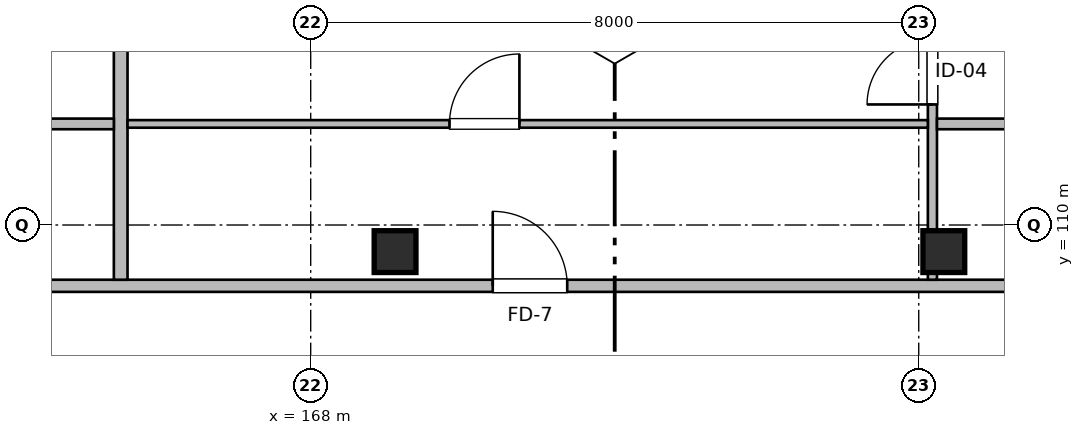
"""IFC4 building model, lengths in metres.
Left out: names, types, materials, properties, quantities, classifications, styles, units other than length and angle.
Written with IfcOpenShell. Run it as: python <this file> out.ifc"""

import sys

from ifc_helpers import new_model, si_unit, direction, frame, frame_2d, origin, origin_2d, place, context, subcontext, project, spatial, rectangle, extrude, element, fill, save


model = new_model("IFC4")
c1 = context("Model", 3, precision=1e-05, world=origin(), true_north=direction((0.0, 1.0)))
c2 = subcontext(c1, "Body", "Model", "MODEL_VIEW")
j1 = project(units=[si_unit("LENGTHUNIT", "METRE"), si_unit("PLANEANGLEUNIT", "RADIAN")], contexts=[c1])
p1 = place(None, origin())
s1 = spatial("IfcSite", under=j1, at=p1, CompositionType="ELEMENT")
p2 = place(p1, origin())
s2 = spatial("IfcBuilding", under=s1, at=p2, CompositionType="ELEMENT")
p3 = place(p2, frame((0.0, 0.0, 29.76)))
s3 = spatial("IfcBuildingStorey", under=s2, at=p3, CompositionType="ELEMENT", Elevation=29.76)
for number, where, z_axis, x_axis in (
    (1, (169.11, 109.65, 0.0), (0.0, 0.0, 1.0), (1.0, 0.0, 0.0)),
    (2, (176.33, 109.65, 0.0), (0.0, 0.0, 1.0), (1.0, 0.0, 0.0)),
):
    element("IfcColumn", number, at=place(p3, frame(where, z_axis=z_axis, x_axis=x_axis)), inside=s3, PredefinedType="COLUMN", context=c2, shape_type="SweptSolid", body=[
        extrude(rectangle(XDim=0.55, YDim=0.55, at=origin_2d()), origin(), (0.0, 0.0, 1.0), 3.2),
    ])
p4 = place(p3, frame((147.16, 109.2, 0.0), z_axis=(0.0, 0.0, 1.0), x_axis=(1.0, 0.0, 0.0)))
e3 = element("IfcWall", 3, at=p4, inside=s3, PredefinedType="PARTITIONING", context=c2, shape_type="SweptSolid", body=[
    extrude(rectangle(XDim=36.68, YDim=0.16, at=frame_2d((18.34, 0.0))), origin(), (0.0, 0.0, 1.0), 2.935),
])
p5 = place(p4, frame((4.805, 0.0, 0.0)))
e4 = element("IfcOpeningElement", 4, at=p5, cuts=e3, PredefinedType="OPENING", context=c2, shape_type="SweptSolid", body=[
    extrude(rectangle(XDim=0.98, YDim=2.15, at=frame_2d((0.49, 1.075))), frame((0.0, 0.09, 0.0), z_axis=(0.0, -1.0, 0.0), x_axis=(1.0, 0.0, 0.0)), (0.0, 0.0, 1.0), 0.18),
])
p6 = place(p4, frame((23.235, 0.0, 0.0)))
e5 = element("IfcOpeningElement", 5, at=p6, cuts=e3, PredefinedType="OPENING", context=c2, shape_type="SweptSolid", body=[
    extrude(rectangle(XDim=0.98, YDim=2.15, at=frame_2d((0.49, 1.075))), frame((0.0, 0.09, 0.0), z_axis=(0.0, -1.0, 0.0), x_axis=(1.0, 0.0, 0.0)), (0.0, 0.0, 1.0), 0.18),
])
p7 = place(p3, frame((165.5, 109.28, 0.0), z_axis=(0.0, 0.0, 1.0), x_axis=(0.0, 1.0, 0.0)))
e6 = element("IfcWall", 6, at=p7, inside=s3, PredefinedType="PARTITIONING", context=c2, shape_type="SweptSolid", body=[
    extrude(rectangle(XDim=6.59, YDim=0.18, at=frame_2d((3.295, 0.0))), origin(), (0.0, 0.0, 1.0), 2.935),
])
p8 = place(p3, frame((157.81, 111.33, 0.0), z_axis=(0.0, 0.0, 1.0), x_axis=(1.0, 0.0, 0.0)))
e7 = element("IfcWall", 7, at=p8, inside=s3, PredefinedType="PARTITIONING", context=c2, shape_type="SweptSolid", body=[
    extrude(rectangle(XDim=7.6, YDim=0.14, at=frame_2d((3.8, 0.0))), origin(), (0.0, 0.0, 1.0), 2.935),
])
p9 = place(p8, frame((3.064, 0.0, 0.0)))
e8 = element("IfcOpeningElement", 8, at=p9, cuts=e7, PredefinedType="OPENING", context=c2, shape_type="SweptSolid", body=[
    extrude(rectangle(XDim=0.85, YDim=2.05, at=frame_2d((0.425, 1.025))), frame((0.0, 0.08, 0.0), z_axis=(0.0, -1.0, 0.0), x_axis=(1.0, 0.0, 0.0)), (0.0, 0.0, 1.0), 0.16),
])
p10 = place(p3, frame((176.18, 109.28, 0.0), z_axis=(0.0, 0.0, 1.0), x_axis=(0.0, 1.0, 0.0)))
e9 = element("IfcWall", 9, at=p10, inside=s3, PredefinedType="PARTITIONING", context=c2, shape_type="SweptSolid", body=[
    extrude(rectangle(XDim=6.59, YDim=0.12, at=frame_2d((3.295, 0.0))), origin(), (0.0, 0.0, 1.0), 2.58),
])
p11 = place(p10, frame((2.306, 0.0, 0.0)))
e10 = element("IfcOpeningElement", 10, at=p11, cuts=e9, PredefinedType="OPENING", context=c2, shape_type="SweptSolid", body=[
    extrude(rectangle(XDim=0.86, YDim=2.1, at=frame_2d((0.43, 1.05))), frame((0.0, 0.07, 0.0), z_axis=(0.0, -1.0, 0.0), x_axis=(1.0, 0.0, 0.0)), (0.0, 0.0, 1.0), 0.14),
])
p12 = place(p10, frame((4.093, 0.0, 0.0)))
e11 = element("IfcOpeningElement", 11, at=p12, cuts=e9, PredefinedType="OPENING", context=c2, shape_type="SweptSolid", body=[
    extrude(rectangle(XDim=0.9, YDim=2.1, at=frame_2d((0.45, 1.05))), frame((0.0, 0.07, 0.0), z_axis=(0.0, -1.0, 0.0), x_axis=(1.0, 0.0, 0.0)), (0.0, 0.0, 1.0), 0.14),
])
p13 = place(p3, frame((176.24, 111.33, 0.0), z_axis=(0.0, 0.0, 1.0), x_axis=(1.0, 0.0, 0.0)))
e12 = element("IfcWall", 12, at=p13, inside=s3, PredefinedType="PARTITIONING", context=c2, shape_type="SweptSolid", body=[
    extrude(rectangle(XDim=7.6, YDim=0.14, at=frame_2d((3.8, 0.0))), origin(), (0.0, 0.0, 1.0), 2.935),
])
p14 = place(p13, frame((3.064, 0.0, 0.0)))
e13 = element("IfcOpeningElement", 13, at=p14, cuts=e12, PredefinedType="OPENING", context=c2, shape_type="SweptSolid", body=[
    extrude(rectangle(XDim=0.85, YDim=2.05, at=frame_2d((0.425, 1.025))), frame((0.0, 0.08, 0.0), z_axis=(0.0, -1.0, 0.0), x_axis=(1.0, 0.0, 0.0)), (0.0, 0.0, 1.0), 0.16),
])
p15 = place(p3, frame((165.59, 111.33, 0.0), z_axis=(0.0, 0.0, 1.0), x_axis=(1.0, 0.0, 0.0)))
e14 = element("IfcWall", 14, at=p15, inside=s3, PredefinedType="PARTITIONING", context=c2, shape_type="SweptSolid", body=[
    extrude(rectangle(XDim=10.53, YDim=0.1, at=frame_2d((5.265, 0.0))), origin(), (0.0, 0.0, 1.0), 2.935),
])
p16 = place(p15, frame((4.236, 0.0, 0.0)))
e15 = element("IfcOpeningElement", 15, at=p16, cuts=e14, PredefinedType="OPENING", context=c2, shape_type="SweptSolid", body=[
    extrude(rectangle(XDim=0.92, YDim=2.1, at=frame_2d((0.46, 1.05))), frame((0.0, 0.06, 0.0), z_axis=(0.0, -1.0, 0.0), x_axis=(1.0, 0.0, 0.0)), (0.0, 0.0, 1.0), 0.12),
])
p17 = place(p6, origin())
e16 = element("IfcDoor", 16, at=p17, inside=s3, OperationType="SINGLE_SWING_LEFT", PredefinedType="DOOR", context=c2, shape_type="SweptSolid", body=[
    extrude(rectangle(XDim=0.98, YDim=2.15, at=frame_2d((0.49, 1.075))), frame((0.0, 0.025, 0.0), z_axis=(0.0, -1.0, 0.0), x_axis=(1.0, 0.0, 0.0)), (0.0, 0.0, 1.0), 0.05),
])
fill(e5, e16)
p18 = place(p16, origin())
e17 = element("IfcDoor", 17, at=p18, inside=s3, OperationType="SINGLE_SWING_RIGHT", PredefinedType="DOOR", context=c2, shape_type="SweptSolid", body=[
    extrude(rectangle(XDim=0.92, YDim=2.1, at=frame_2d((0.46, 1.05))), frame((0.0, 0.025, 0.0), z_axis=(0.0, -1.0, 0.0), x_axis=(1.0, 0.0, 0.0)), (0.0, 0.0, 1.0), 0.05),
])
fill(e15, e17)
p19 = place(p11, origin())
e18 = element("IfcDoor", 18, at=p19, inside=s3, OperationType="SINGLE_SWING_LEFT", PredefinedType="DOOR", context=c2, shape_type="SweptSolid", body=[
    extrude(rectangle(XDim=0.86, YDim=2.1, at=frame_2d((0.43, 1.05))), frame((0.0, 0.025, 0.0), z_axis=(0.0, -1.0, 0.0), x_axis=(1.0, 0.0, 0.0)), (0.0, 0.0, 1.0), 0.05),
])
fill(e10, e18)
save(model, sys.argv[1])
